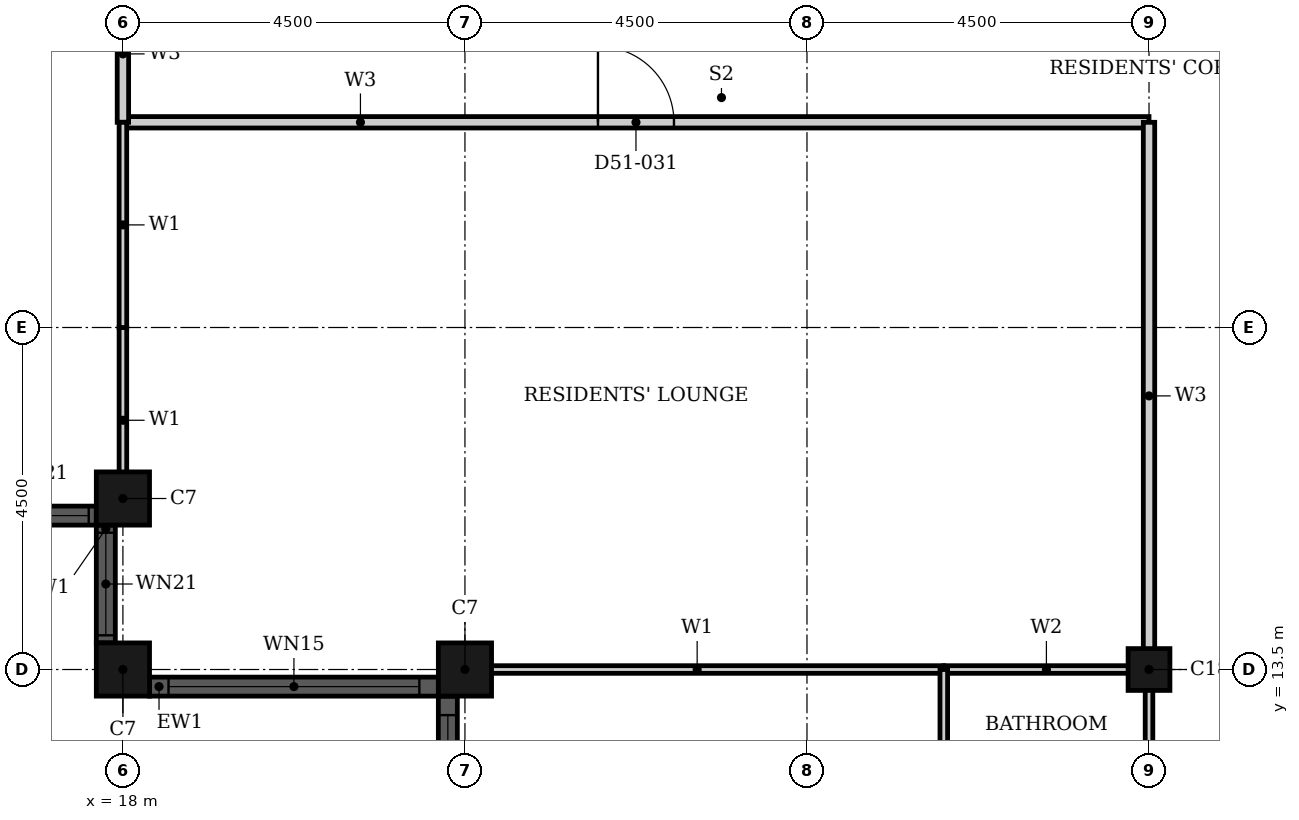
"""IFC4 building model, lengths in metres.
Left out: names, types, materials, properties, quantities, classifications, styles, units other than length and angle.
Written with IfcOpenShell. Run it as: python <this file> out.ifc"""

import sys

from ifc_helpers import new_model, si_unit, direction, frame, frame_2d, origin, origin_2d, place, context, subcontext, project, spatial, rectangle, hollow_rectangle, extrude, element, fill, save


model = new_model("IFC4")
c1 = context("Model", 3, precision=1e-05, world=origin(), true_north=direction((0.0, 1.0)))
c2 = subcontext(c1, "Body", "Model", "MODEL_VIEW")
j1 = project(units=[si_unit("LENGTHUNIT", "METRE"), si_unit("PLANEANGLEUNIT", "RADIAN")], contexts=[c1])
p1 = place(None, origin())
s1 = spatial("IfcSite", under=j1, at=p1, CompositionType="ELEMENT")
p2 = place(p1, origin())
s2 = spatial("IfcBuilding", under=s1, at=p2, CompositionType="ELEMENT")
p3 = place(p2, frame((0.0, 0.0, 203.5)))
s3 = spatial("IfcBuildingStorey", under=s2, at=p3, CompositionType="ELEMENT", Elevation=203.5)
for number, where, z_axis, x_axis in (
    (1, (18.0, 15.75, 0.0), (0.0, 0.0, 1.0), (1.0, 0.0, 0.0)),
    (2, (18.0, 13.5, 0.0), (0.0, 0.0, 1.0), (1.0, 0.0, 0.0)),
    (3, (22.5, 13.5, 0.0), (0.0, 0.0, 1.0), (1.0, 0.0, 0.0)),
):
    element("IfcColumn", number, at=place(p3, frame(where, z_axis=z_axis, x_axis=x_axis)), inside=s3, PredefinedType="COLUMN", context=c2, shape_type="SweptSolid", body=[
        extrude(hollow_rectangle(XDim=0.7, YDim=0.7, WallThickness=0.022, at=origin_2d()), origin(), (0.0, 0.0, 1.0), 3.7),
    ])
p4 = place(p3, frame((31.5, 13.5, 0.0), z_axis=(0.0, 0.0, 1.0), x_axis=(1.0, 0.0, 0.0)))
e4 = element("IfcColumn", 4, at=p4, inside=s3, PredefinedType="COLUMN", context=c2, shape_type="SweptSolid", body=[
    extrude(hollow_rectangle(XDim=0.55, YDim=0.55, WallThickness=0.018, at=origin_2d()), origin(), (0.0, 0.0, 1.0), 3.7),
])
p5 = place(p3, frame((16.1, 15.525, 0.0), z_axis=(0.0, 0.0, 1.0), x_axis=(1.0, 0.0, 0.0)))
e5 = element("IfcWall", 5, at=p5, inside=s3, PredefinedType="SOLIDWALL", context=c2, shape_type="SweptSolid", body=[
    extrude(rectangle(XDim=1.55, YDim=0.25, at=frame_2d((0.775, 0.0))), origin(), (0.0, 0.0, 1.0), 3.7),
])
p6 = place(p5, frame((0.1, 0.0, 0.9)))
e6 = element("IfcOpeningElement", 6, at=p6, cuts=e5, PredefinedType="OPENING", context=c2, shape_type="SweptSolid", body=[
    extrude(rectangle(XDim=1.35, YDim=1.85, at=frame_2d((0.675, 0.925))), frame((0.0, 0.135, 0.0), z_axis=(0.0, -1.0, 0.0), x_axis=(1.0, 0.0, 0.0)), (0.0, 0.0, 1.0), 0.27),
])
p7 = place(p3, frame((17.775, 15.4, 0.0), z_axis=(0.0, 0.0, 1.0), x_axis=(0.0, -1.0, 0.0)))
e7 = element("IfcWall", 7, at=p7, inside=s3, PredefinedType="SOLIDWALL", context=c2, shape_type="SweptSolid", body=[
    extrude(rectangle(XDim=1.55, YDim=0.25, at=frame_2d((0.775, 0.0))), origin(), (0.0, 0.0, 1.0), 3.7),
])
p8 = place(p7, frame((0.1, 0.0, 0.9)))
e8 = element("IfcOpeningElement", 8, at=p8, cuts=e7, PredefinedType="OPENING", context=c2, shape_type="SweptSolid", body=[
    extrude(rectangle(XDim=1.35, YDim=1.85, at=frame_2d((0.675, 0.925))), frame((0.0, 0.135, 0.0), z_axis=(0.0, -1.0, 0.0), x_axis=(1.0, 0.0, 0.0)), (0.0, 0.0, 1.0), 0.27),
])
p9 = place(p3, frame((18.35, 13.275, 0.0), z_axis=(0.0, 0.0, 1.0), x_axis=(1.0, 0.0, 0.0)))
e9 = element("IfcWall", 9, at=p9, inside=s3, PredefinedType="SOLIDWALL", context=c2, shape_type="SweptSolid", body=[
    extrude(rectangle(XDim=3.8, YDim=0.25, at=frame_2d((1.9, 0.0))), origin(), (0.0, 0.0, 1.0), 3.7),
])
p10 = place(p9, frame((0.25, 0.0, 0.45)))
e10 = element("IfcOpeningElement", 10, at=p10, cuts=e9, PredefinedType="OPENING", context=c2, shape_type="SweptSolid", body=[
    extrude(rectangle(XDim=3.3, YDim=2.3, at=frame_2d((1.65, 1.15))), frame((0.0, 0.135, 0.0), z_axis=(0.0, -1.0, 0.0), x_axis=(1.0, 0.0, 0.0)), (0.0, 0.0, 1.0), 0.27),
])
p11 = place(p3, frame((22.275, 13.15, 0.0), z_axis=(0.0, 0.0, 1.0), x_axis=(0.0, -1.0, 0.0)))
e11 = element("IfcWall", 11, at=p11, inside=s3, PredefinedType="SOLIDWALL", context=c2, shape_type="SweptSolid", body=[
    extrude(rectangle(XDim=8.3, YDim=0.25, at=frame_2d((4.15, 0.0))), origin(), (0.0, 0.0, 1.0), 3.7),
])
p12 = place(p11, frame((0.25, 0.0, 0.45)))
e12 = element("IfcOpeningElement", 12, at=p12, cuts=e11, PredefinedType="OPENING", context=c2, shape_type="SweptSolid", body=[
    extrude(rectangle(XDim=3.3, YDim=2.3, at=frame_2d((1.65, 1.15))), frame((0.0, 0.135, 0.0), z_axis=(0.0, -1.0, 0.0), x_axis=(1.0, 0.0, 0.0)), (0.0, 0.0, 1.0), 0.27),
])
p13 = place(p11, frame((4.75, 0.0, 0.45)))
e13 = element("IfcOpeningElement", 13, at=p13, cuts=e11, PredefinedType="OPENING", context=c2, shape_type="SweptSolid", body=[
    extrude(rectangle(XDim=3.3, YDim=2.3, at=frame_2d((1.65, 1.15))), frame((0.0, 0.135, 0.0), z_axis=(0.0, -1.0, 0.0), x_axis=(1.0, 0.0, 0.0)), (0.0, 0.0, 1.0), 0.27),
])
p14 = place(p3, frame((18.0, 20.7, 0.0), z_axis=(0.0, 0.0, 1.0), x_axis=(1.0, 0.0, 0.0)))
e14 = element("IfcWall", 14, at=p14, inside=s3, PredefinedType="PARTITIONING", context=c2, shape_type="SweptSolid", body=[
    extrude(rectangle(XDim=13.5, YDim=0.15, at=frame_2d((6.75, 0.0))), origin(), (0.0, 0.0, 1.0), 3.4),
])
p15 = place(p14, frame((6.25, 0.0, 0.0)))
e15 = element("IfcOpeningElement", 15, at=p15, cuts=e14, PredefinedType="OPENING", context=c2, shape_type="SweptSolid", body=[
    extrude(rectangle(XDim=1.0, YDim=2.1, at=frame_2d((0.5, 1.05))), frame((0.0, 0.085, 0.0), z_axis=(0.0, -1.0, 0.0), x_axis=(1.0, 0.0, 0.0)), (0.0, 0.0, 1.0), 0.17),
])
p16 = place(p3, frame((18.0, 20.7, 0.0), z_axis=(0.0, 0.0, 1.0), x_axis=(0.0, 1.0, 0.0)))
e16 = element("IfcWall", 16, at=p16, inside=s3, PredefinedType="PARTITIONING", context=c2, shape_type="SweptSolid", body=[
    extrude(rectangle(XDim=1.8, YDim=0.15, at=frame_2d((0.9, 0.0))), origin(), (0.0, 0.0, 1.0), 3.4),
])
p17 = place(p3, frame((31.5, 13.5, 0.0), z_axis=(0.0, 0.0, 1.0), x_axis=(0.0, 1.0, 0.0)))
e17 = element("IfcWall", 17, at=p17, inside=s3, PredefinedType="PARTITIONING", context=c2, shape_type="SweptSolid", body=[
    extrude(rectangle(XDim=7.2, YDim=0.15, at=frame_2d((3.6, 0.0))), origin(), (0.0, 0.0, 1.0), 3.4),
])
p18 = place(p3, frame((22.31, 13.5, 0.0), z_axis=(0.0, 0.0, 1.0), x_axis=(1.0, 0.0, 0.0)))
e18 = element("IfcWall", 18, at=p18, inside=s3, PredefinedType="PARTITIONING", context=c2, shape_type="SweptSolid", body=[
    extrude(rectangle(XDim=6.49, YDim=0.1, at=frame_2d((3.245, 0.0))), origin(), (0.0, 0.0, 1.0), 2.48),
])
p19 = place(p3, frame((18.0, 15.56, 0.0), z_axis=(0.0, 0.0, 1.0), x_axis=(0.0, 1.0, 0.0)))
e19 = element("IfcWall", 19, at=p19, inside=s3, PredefinedType="PARTITIONING", context=c2, shape_type="SweptSolid", body=[
    extrude(rectangle(XDim=2.439, YDim=0.1, at=frame_2d((1.219, 0.0))), origin(), (0.0, 0.0, 1.0), 3.4),
])
p20 = place(p3, frame((18.0, 18.0, 0.0), z_axis=(0.0, 0.0, 1.0), x_axis=(0.0, 1.0, 0.0)))
e20 = element("IfcWall", 20, at=p20, inside=s3, PredefinedType="PARTITIONING", context=c2, shape_type="SweptSolid", body=[
    extrude(rectangle(XDim=2.7, YDim=0.1, at=frame_2d((1.35, 0.0))), origin(), (0.0, 0.0, 1.0), 3.4),
])
p21 = place(p3, frame((28.8, 13.5, 0.0), z_axis=(0.0, 0.0, 1.0), x_axis=(1.0, 0.0, 0.0)))
e21 = element("IfcWall", 21, at=p21, inside=s3, PredefinedType="PARTITIONING", context=c2, shape_type="SweptSolid", body=[
    extrude(rectangle(XDim=2.7, YDim=0.1, at=frame_2d((1.35, 0.0))), origin(), (0.0, 0.0, 1.0), 2.48),
])
p22 = place(p3, frame((28.8, 11.1, 0.0), z_axis=(0.0, 0.0, 1.0), x_axis=(0.0, 1.0, 0.0)))
e22 = element("IfcWall", 22, at=p22, inside=s3, PredefinedType="PARTITIONING", context=c2, shape_type="SweptSolid", body=[
    extrude(rectangle(XDim=2.4, YDim=0.1, at=frame_2d((1.2, 0.0))), origin(), (0.0, 0.0, 1.0), 3.4),
])
p23 = place(p3, frame((31.5, 11.1, 0.0), z_axis=(0.0, 0.0, 1.0), x_axis=(0.0, 1.0, 0.0)))
e23 = element("IfcWall", 23, at=p23, inside=s3, PredefinedType="PARTITIONING", context=c2, shape_type="SweptSolid", body=[
    extrude(rectangle(XDim=2.4, YDim=0.1, at=frame_2d((1.2, 0.0))), origin(), (0.0, 0.0, 1.0), 2.68),
])
p24 = place(p6, origin())
e24 = element("IfcWindow", 24, at=p24, inside=s3, PartitioningType="SINGLE_PANEL", PredefinedType="WINDOW", context=c2, shape_type="SweptSolid", body=[
    extrude(rectangle(XDim=1.35, YDim=1.85, at=frame_2d((0.675, 0.925))), frame((0.0, 0.03, 0.0), z_axis=(0.0, -1.0, 0.0), x_axis=(1.0, 0.0, 0.0)), (0.0, 0.0, 1.0), 0.06),
])
fill(e6, e24)
p25 = place(p8, origin())
e25 = element("IfcWindow", 25, at=p25, inside=s3, PartitioningType="SINGLE_PANEL", PredefinedType="WINDOW", context=c2, shape_type="SweptSolid", body=[
    extrude(rectangle(XDim=1.35, YDim=1.85, at=frame_2d((0.675, 0.925))), frame((0.0, 0.03, 0.0), z_axis=(0.0, -1.0, 0.0), x_axis=(1.0, 0.0, 0.0)), (0.0, 0.0, 1.0), 0.06),
])
fill(e8, e25)
p26 = place(p10, origin())
e26 = element("IfcWindow", 26, at=p26, inside=s3, PartitioningType="SINGLE_PANEL", PredefinedType="WINDOW", context=c2, shape_type="SweptSolid", body=[
    extrude(rectangle(XDim=3.3, YDim=2.3, at=frame_2d((1.65, 1.15))), frame((0.0, 0.03, 0.0), z_axis=(0.0, -1.0, 0.0), x_axis=(1.0, 0.0, 0.0)), (0.0, 0.0, 1.0), 0.06),
])
fill(e10, e26)
p27 = place(p12, origin())
e27 = element("IfcWindow", 27, at=p27, inside=s3, PartitioningType="SINGLE_PANEL", PredefinedType="WINDOW", context=c2, shape_type="SweptSolid", body=[
    extrude(rectangle(XDim=3.3, YDim=2.3, at=frame_2d((1.65, 1.15))), frame((0.0, 0.03, 0.0), z_axis=(0.0, -1.0, 0.0), x_axis=(1.0, 0.0, 0.0)), (0.0, 0.0, 1.0), 0.06),
])
fill(e12, e27)
p28 = place(p15, origin())
e28 = element("IfcDoor", 28, at=p28, inside=s3, OperationType="SINGLE_SWING_RIGHT", PredefinedType="DOOR", context=c2, shape_type="SweptSolid", body=[
    extrude(rectangle(XDim=1.0, YDim=2.1, at=frame_2d((0.5, 1.05))), frame((0.0, 0.025, 0.0), z_axis=(0.0, -1.0, 0.0), x_axis=(1.0, 0.0, 0.0)), (0.0, 0.0, 1.0), 0.05),
])
fill(e15, e28)
save(model, sys.argv[1])
